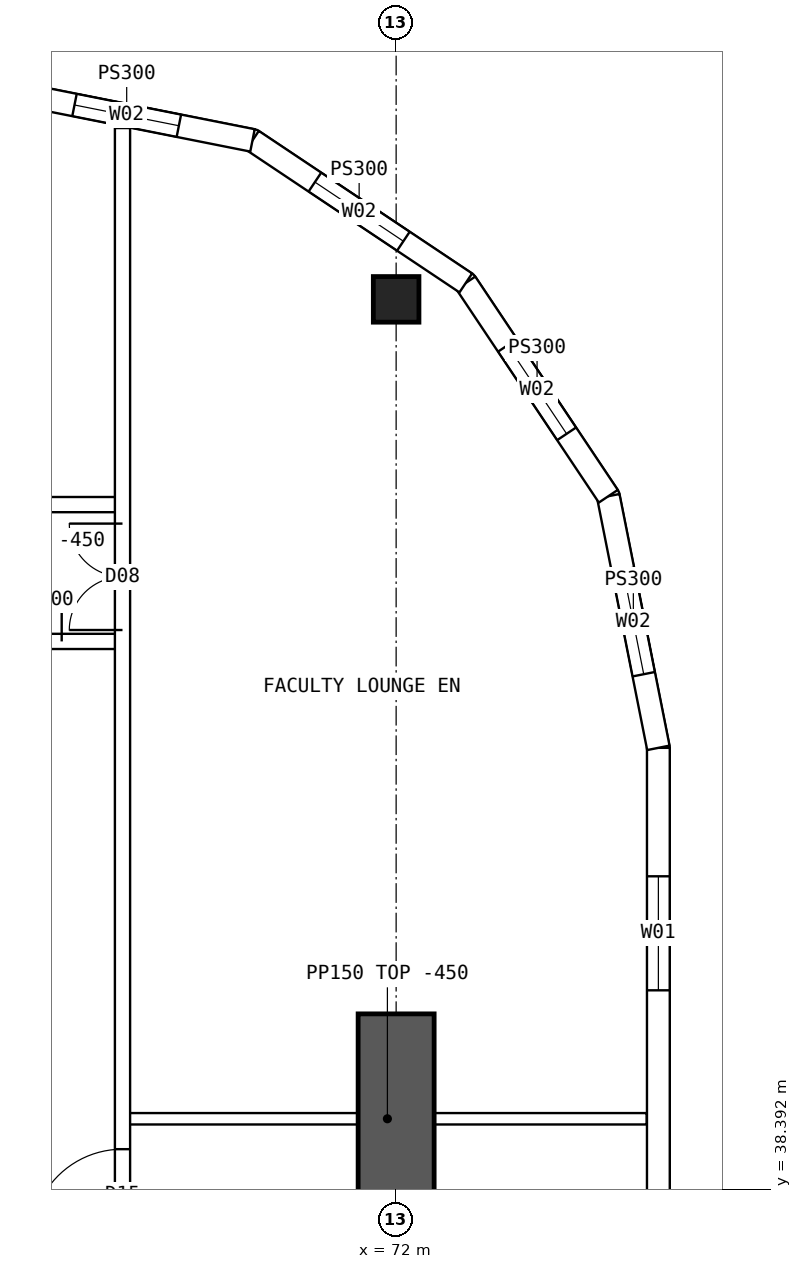
"""IFC4 building model, lengths in metres.
Left out: names, types, materials, properties, quantities, classifications, styles, units other than length and angle.
Written with IfcOpenShell. Run it as: python <this file> out.ifc"""

import sys

from ifc_helpers import new_model, si_unit, direction, frame, frame_2d, origin, origin_2d, place, context, subcontext, project, spatial, polyline, rectangle, hollow_rectangle, outline, extrude, element, fill, save


model = new_model("IFC4")
c1 = context("Model", 3, precision=1e-05, world=origin(), true_north=direction((0.0, 1.0)))
c2 = subcontext(c1, "Body", "Model", "MODEL_VIEW")
j1 = project(units=[si_unit("LENGTHUNIT", "METRE"), si_unit("PLANEANGLEUNIT", "RADIAN")], contexts=[c1])
p1 = place(None, origin())
s1 = spatial("IfcSite", under=j1, at=p1, CompositionType="ELEMENT")
p2 = place(p1, origin())
s2 = spatial("IfcBuilding", under=s1, at=p2, CompositionType="ELEMENT")
p3 = place(p2, frame((0.0, 0.0, 212.8)))
s3 = spatial("IfcBuildingStorey", under=s2, at=p3, CompositionType="ELEMENT", Elevation=212.8)
p4 = place(p3, frame((72.0, 50.1, 0.0), z_axis=(0.0, 0.0, 1.0), x_axis=(1.0, 0.0, 0.0)))
e1 = element("IfcColumn", 1, at=p4, inside=s3, PredefinedType="COLUMN", context=c2, shape_type="SweptSolid", body=[
    extrude(hollow_rectangle(XDim=0.6, YDim=0.6, WallThickness=0.06, at=origin_2d()), origin(), (0.0, 0.0, 1.0), 3.75),
])
p5 = place(p3, frame((72.0, 35.7, 0.0), z_axis=(0.0, 0.0, 1.0), x_axis=(0.0, 1.0, 0.0)))
e2 = element("IfcWall", 2, at=p5, inside=s3, PredefinedType="SHEAR", context=c2, shape_type="SweptSolid", body=[
    extrude(rectangle(XDim=5.0, YDim=1.0, at=frame_2d((2.5, 0.0))), origin(), (0.0, 0.0, 1.0), 3.75),
])
p6 = place(p3, frame((75.45, 19.8, 0.0), z_axis=(0.0, 0.0, 1.0), x_axis=(0.0, 1.0, 0.0)))
e3 = element("IfcWall", 3, at=p6, inside=s3, PredefinedType="SOLIDWALL", context=c2, shape_type="SweptSolid", body=[
    extrude(outline(polyline([(-0.015, -0.15), (24.415, -0.15), (24.385, 0.15), (0.015, 0.15), (-0.015, -0.15)])), origin(), (0.0, 0.0, 1.0), 3.3),
])
p7 = place(p6, frame((1.69, 0.0, 0.9)))
e4 = element("IfcOpeningElement", 4, at=p7, cuts=e3, PredefinedType="OPENING", context=c2, shape_type="SweptSolid", body=[
    extrude(rectangle(XDim=1.5, YDim=2.0, at=frame_2d((0.75, 1.0))), frame((0.0, 0.16, 0.0), z_axis=(0.0, -1.0, 0.0), x_axis=(1.0, 0.0, 0.0)), (0.0, 0.0, 1.0), 0.32),
])
p8 = place(p6, frame((6.57, 0.0, 0.9)))
e5 = element("IfcOpeningElement", 5, at=p8, cuts=e3, PredefinedType="OPENING", context=c2, shape_type="SweptSolid", body=[
    extrude(rectangle(XDim=1.5, YDim=2.0, at=frame_2d((0.75, 1.0))), frame((0.0, 0.16, 0.0), z_axis=(0.0, -1.0, 0.0), x_axis=(1.0, 0.0, 0.0)), (0.0, 0.0, 1.0), 0.32),
])
p9 = place(p6, frame((11.45, 0.0, 0.9)))
e6 = element("IfcOpeningElement", 6, at=p9, cuts=e3, PredefinedType="OPENING", context=c2, shape_type="SweptSolid", body=[
    extrude(rectangle(XDim=1.5, YDim=2.0, at=frame_2d((0.75, 1.0))), frame((0.0, 0.16, 0.0), z_axis=(0.0, -1.0, 0.0), x_axis=(1.0, 0.0, 0.0)), (0.0, 0.0, 1.0), 0.32),
])
p10 = place(p6, frame((16.33, 0.0, 0.9)))
e7 = element("IfcOpeningElement", 7, at=p10, cuts=e3, PredefinedType="OPENING", context=c2, shape_type="SweptSolid", body=[
    extrude(rectangle(XDim=1.5, YDim=2.0, at=frame_2d((0.75, 1.0))), frame((0.0, 0.16, 0.0), z_axis=(0.0, -1.0, 0.0), x_axis=(1.0, 0.0, 0.0)), (0.0, 0.0, 1.0), 0.32),
])
p11 = place(p6, frame((21.21, 0.0, 0.9)))
e8 = element("IfcOpeningElement", 8, at=p11, cuts=e3, PredefinedType="OPENING", context=c2, shape_type="SweptSolid", body=[
    extrude(rectangle(XDim=1.5, YDim=2.0, at=frame_2d((0.75, 1.0))), frame((0.0, 0.16, 0.0), z_axis=(0.0, -1.0, 0.0), x_axis=(1.0, 0.0, 0.0)), (0.0, 0.0, 1.0), 0.32),
])
p12 = place(p3, frame((75.45, 44.2, 0.0), z_axis=(0.0, 0.0, 1.0), x_axis=(-0.19508664885, 0.980786011034, 0.0)))
e9 = element("IfcWall", 9, at=p12, inside=s3, PredefinedType="SOLIDWALL", context=c2, shape_type="SweptSolid", body=[
    extrude(outline(polyline([(-0.015, -0.15), (3.405, -0.15), (3.345, 0.15), (0.015, 0.15), (-0.015, -0.15)])), origin(), (0.0, 0.0, 1.0), 3.3),
])
p13 = place(p12, frame((0.988, 0.0, 0.9)))
e10 = element("IfcOpeningElement", 10, at=p13, cuts=e9, PredefinedType="OPENING", context=c2, shape_type="SweptSolid", body=[
    extrude(rectangle(XDim=1.4, YDim=1.8, at=frame_2d((0.7, 0.9))), frame((0.0, 0.16, 0.0), z_axis=(0.0, -1.0, 0.0), x_axis=(1.0, 0.0, 0.0)), (0.0, 0.0, 1.0), 0.32),
])
p14 = place(p3, frame((74.792, 47.51, 0.0), z_axis=(0.0, 0.0, 1.0), x_axis=(-0.555567969291, 0.831471124873, 0.0)))
e11 = element("IfcWall", 11, at=p14, inside=s3, PredefinedType="SOLIDWALL", context=c2, shape_type="SweptSolid", body=[
    extrude(outline(polyline([(-0.03, -0.15), (3.405, -0.15), (3.345, 0.15), (0.03, 0.15), (-0.03, -0.15)])), origin(), (0.0, 0.0, 1.0), 3.3),
])
p15 = place(p14, frame((0.988, 0.0, 0.9)))
e12 = element("IfcOpeningElement", 12, at=p15, cuts=e11, PredefinedType="OPENING", context=c2, shape_type="SweptSolid", body=[
    extrude(rectangle(XDim=1.4, YDim=1.8, at=frame_2d((0.7, 0.9))), frame((0.0, 0.16, 0.0), z_axis=(0.0, -1.0, 0.0), x_axis=(1.0, 0.0, 0.0)), (0.0, 0.0, 1.0), 0.32),
])
p16 = place(p3, frame((72.917, 50.316, 0.0), z_axis=(0.0, 0.0, 1.0), x_axis=(-0.831460037396, 0.555584562613, 0.0)))
e13 = element("IfcWall", 13, at=p16, inside=s3, PredefinedType="SOLIDWALL", context=c2, shape_type="SweptSolid", body=[
    extrude(outline(polyline([(-0.03, -0.15), (3.405, -0.15), (3.345, 0.15), (0.03, 0.15), (-0.03, -0.15)])), origin(), (0.0, 0.0, 1.0), 3.3),
])
p17 = place(p16, frame((0.988, 0.0, 0.9)))
e14 = element("IfcOpeningElement", 14, at=p17, cuts=e13, PredefinedType="OPENING", context=c2, shape_type="SweptSolid", body=[
    extrude(rectangle(XDim=1.4, YDim=1.8, at=frame_2d((0.7, 0.9))), frame((0.0, 0.16, 0.0), z_axis=(0.0, -1.0, 0.0), x_axis=(1.0, 0.0, 0.0)), (0.0, 0.0, 1.0), 0.32),
])
p18 = place(p3, frame((70.11, 52.192, 0.0), z_axis=(0.0, 0.0, 1.0), x_axis=(-0.98078325777, 0.195100490205, 0.0)))
e15 = element("IfcWall", 15, at=p18, inside=s3, PredefinedType="SOLIDWALL", context=c2, shape_type="SweptSolid", body=[
    extrude(outline(polyline([(-0.03, -0.15), (3.405, -0.15), (3.345, 0.15), (0.03, 0.15), (-0.03, -0.15)])), origin(), (0.0, 0.0, 1.0), 3.3),
])
p19 = place(p18, frame((0.988, 0.0, 0.9)))
e16 = element("IfcOpeningElement", 16, at=p19, cuts=e15, PredefinedType="OPENING", context=c2, shape_type="SweptSolid", body=[
    extrude(rectangle(XDim=1.4, YDim=1.8, at=frame_2d((0.7, 0.9))), frame((0.0, 0.16, 0.0), z_axis=(0.0, -1.0, 0.0), x_axis=(1.0, 0.0, 0.0)), (0.0, 0.0, 1.0), 0.32),
])
p20 = place(p3, frame((66.35, 47.4, 0.0), z_axis=(0.0, 0.0, 1.0), x_axis=(1.0, 0.0, 0.0)))
e17 = element("IfcWall", 17, at=p20, inside=s3, PredefinedType="SOLIDWALL", context=c2, shape_type="SweptSolid", body=[
    extrude(rectangle(XDim=2.05, YDim=0.2, at=frame_2d((1.025, 0.0))), origin(), (0.0, 0.0, 1.0), 3.3),
])
p21 = place(p20, frame((0.2, 0.0, 0.0)))
e18 = element("IfcOpeningElement", 18, at=p21, cuts=e17, PredefinedType="OPENING", context=c2, shape_type="SweptSolid", body=[
    extrude(rectangle(XDim=0.9, YDim=2.1, at=frame_2d((0.45, 1.05))), frame((0.0, 0.11, 0.0), z_axis=(0.0, -1.0, 0.0), x_axis=(1.0, 0.0, 0.0)), (0.0, 0.0, 1.0), 0.22),
])
p22 = place(p3, frame((66.35, 45.6, 0.0), z_axis=(0.0, 0.0, 1.0), x_axis=(1.0, 0.0, 0.0)))
e19 = element("IfcWall", 19, at=p22, inside=s3, PredefinedType="SOLIDWALL", context=c2, shape_type="SweptSolid", body=[
    extrude(rectangle(XDim=2.05, YDim=0.2, at=frame_2d((1.025, 0.0))), origin(), (0.0, 0.0, 1.0), 3.3),
])
p23 = place(p22, frame((0.05, 0.0, 0.0)))
e20 = element("IfcOpeningElement", 20, at=p23, cuts=e19, PredefinedType="OPENING", context=c2, shape_type="SweptSolid", body=[
    extrude(rectangle(XDim=1.2, YDim=2.1, at=frame_2d((0.6, 1.05))), frame((0.0, 0.11, 0.0), z_axis=(0.0, -1.0, 0.0), x_axis=(1.0, 0.0, 0.0)), (0.0, 0.0, 1.0), 0.22),
])
p24 = place(p3, frame((68.4, 11.646, 0.0), z_axis=(0.0, 0.0, 1.0), x_axis=(0.0, 1.0, 0.0)))
e21 = element("IfcWall", 21, at=p24, inside=s3, PredefinedType="SOLIDWALL", context=c2, shape_type="SweptSolid", body=[
    extrude(rectangle(XDim=40.708, YDim=0.2, at=frame_2d((20.354, 0.0))), origin(), (0.0, 0.0, 1.0), 3.3),
])
p25 = place(p24, frame((13.434, 0.0, 0.0)))
e22 = element("IfcOpeningElement", 22, at=p25, cuts=e21, PredefinedType="OPENING", context=c2, shape_type="SweptSolid", body=[
    extrude(rectangle(XDim=1.2, YDim=2.1, at=frame_2d((0.6, 1.05))), frame((0.0, 0.11, 0.0), z_axis=(0.0, -1.0, 0.0), x_axis=(1.0, 0.0, 0.0)), (0.0, 0.0, 1.0), 0.22),
])
p26 = place(p24, frame((26.074, 0.0, 0.0)))
e23 = element("IfcOpeningElement", 23, at=p26, cuts=e21, PredefinedType="OPENING", context=c2, shape_type="SweptSolid", body=[
    extrude(rectangle(XDim=1.2, YDim=2.1, at=frame_2d((0.6, 1.05))), frame((0.0, 0.11, 0.0), z_axis=(0.0, -1.0, 0.0), x_axis=(1.0, 0.0, 0.0)), (0.0, 0.0, 1.0), 0.22),
])
p27 = place(p24, frame((5.104, 0.0, 0.0)))
e24 = element("IfcOpeningElement", 24, at=p27, cuts=e21, PredefinedType="OPENING", context=c2, shape_type="SweptSolid", body=[
    extrude(rectangle(XDim=1.4, YDim=2.1, at=frame_2d((0.7, 1.05))), frame((0.0, 0.11, 0.0), z_axis=(0.0, -1.0, 0.0), x_axis=(1.0, 0.0, 0.0)), (0.0, 0.0, 1.0), 0.22),
])
p28 = place(p24, frame((34.104, 0.0, 0.0)))
e25 = element("IfcOpeningElement", 25, at=p28, cuts=e21, PredefinedType="OPENING", context=c2, shape_type="SweptSolid", body=[
    extrude(rectangle(XDim=1.4, YDim=2.1, at=frame_2d((0.7, 1.05))), frame((0.0, 0.11, 0.0), z_axis=(0.0, -1.0, 0.0), x_axis=(1.0, 0.0, 0.0)), (0.0, 0.0, 1.0), 0.22),
])
p29 = place(p3, frame((68.475, 39.32, 0.0), z_axis=(0.0, 0.0, 1.0), x_axis=(1.0, 0.0, 0.0)))
e26 = element("IfcWall", 26, at=p29, inside=s3, PredefinedType="PARTITIONING", context=c2, shape_type="SweptSolid", body=[
    extrude(rectangle(XDim=6.82, YDim=0.15, at=frame_2d((3.41, 0.0))), origin(), (0.0, 0.0, 1.0), 3.3),
])
p30 = place(p11, origin())
e27 = element("IfcWindow", 27, at=p30, inside=s3, PartitioningType="SINGLE_PANEL", PredefinedType="WINDOW", context=c2, shape_type="SweptSolid", body=[
    extrude(rectangle(XDim=1.5, YDim=2.0, at=frame_2d((0.75, 1.0))), frame((0.0, 0.03, 0.0), z_axis=(0.0, -1.0, 0.0), x_axis=(1.0, 0.0, 0.0)), (0.0, 0.0, 1.0), 0.06),
])
fill(e8, e27)
p31 = place(p13, origin())
e28 = element("IfcWindow", 28, at=p31, inside=s3, PartitioningType="SINGLE_PANEL", PredefinedType="WINDOW", context=c2, shape_type="SweptSolid", body=[
    extrude(rectangle(XDim=1.4, YDim=1.8, at=frame_2d((0.7, 0.9))), frame((0.0, 0.03, 0.0), z_axis=(0.0, -1.0, 0.0), x_axis=(1.0, 0.0, 0.0)), (0.0, 0.0, 1.0), 0.06),
])
fill(e10, e28)
p32 = place(p15, origin())
e29 = element("IfcWindow", 29, at=p32, inside=s3, PartitioningType="SINGLE_PANEL", PredefinedType="WINDOW", context=c2, shape_type="SweptSolid", body=[
    extrude(rectangle(XDim=1.4, YDim=1.8, at=frame_2d((0.7, 0.9))), frame((0.0, 0.03, 0.0), z_axis=(0.0, -1.0, 0.0), x_axis=(1.0, 0.0, 0.0)), (0.0, 0.0, 1.0), 0.06),
])
fill(e12, e29)
p33 = place(p17, origin())
e30 = element("IfcWindow", 30, at=p33, inside=s3, PartitioningType="SINGLE_PANEL", PredefinedType="WINDOW", context=c2, shape_type="SweptSolid", body=[
    extrude(rectangle(XDim=1.4, YDim=1.8, at=frame_2d((0.7, 0.9))), frame((0.0, 0.03, 0.0), z_axis=(0.0, -1.0, 0.0), x_axis=(1.0, 0.0, 0.0)), (0.0, 0.0, 1.0), 0.06),
])
fill(e14, e30)
p34 = place(p19, origin())
e31 = element("IfcWindow", 31, at=p34, inside=s3, PartitioningType="SINGLE_PANEL", PredefinedType="WINDOW", context=c2, shape_type="SweptSolid", body=[
    extrude(rectangle(XDim=1.4, YDim=1.8, at=frame_2d((0.7, 0.9))), frame((0.0, 0.03, 0.0), z_axis=(0.0, -1.0, 0.0), x_axis=(1.0, 0.0, 0.0)), (0.0, 0.0, 1.0), 0.06),
])
fill(e16, e31)
p35 = place(p23, origin())
e32 = element("IfcDoor", 32, at=p35, inside=s3, OperationType="DOUBLE_DOOR_SINGLE_SWING", PredefinedType="DOOR", context=c2, shape_type="SweptSolid", body=[
    extrude(rectangle(XDim=1.2, YDim=2.1, at=frame_2d((0.6, 1.05))), frame((0.0, 0.025, 0.0), z_axis=(0.0, -1.0, 0.0), x_axis=(1.0, 0.0, 0.0)), (0.0, 0.0, 1.0), 0.05),
])
fill(e20, e32)
p36 = place(p26, origin())
e33 = element("IfcDoor", 33, at=p36, inside=s3, OperationType="SINGLE_SWING_LEFT", PredefinedType="DOOR", context=c2, shape_type="SweptSolid", body=[
    extrude(rectangle(XDim=1.2, YDim=2.1, at=frame_2d((0.6, 1.05))), frame((0.0, 0.025, 0.0), z_axis=(0.0, -1.0, 0.0), x_axis=(1.0, 0.0, 0.0)), (0.0, 0.0, 1.0), 0.05),
])
fill(e23, e33)
p37 = place(p28, origin())
e34 = element("IfcDoor", 34, at=p37, inside=s3, OperationType="DOUBLE_DOOR_SINGLE_SWING", PredefinedType="DOOR", context=c2, shape_type="SweptSolid", body=[
    extrude(rectangle(XDim=1.4, YDim=2.1, at=frame_2d((0.7, 1.05))), frame((0.0, 0.025, 0.0), z_axis=(0.0, -1.0, 0.0), x_axis=(1.0, 0.0, 0.0)), (0.0, 0.0, 1.0), 0.05),
])
fill(e25, e34)
save(model, sys.argv[1])
